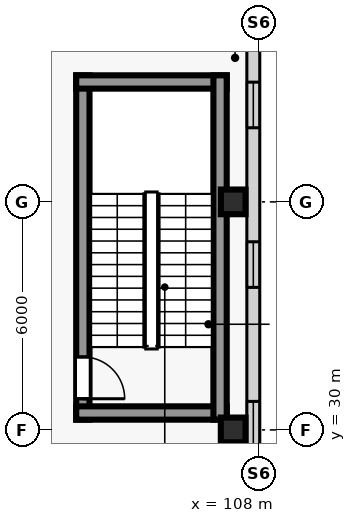
"""IFC4 building model, lengths in metres.
Left out: names, types, materials, properties, quantities, classifications, styles, units other than length and angle.
Written with IfcOpenShell. Run it as: python <this file> out.ifc"""

import sys

from ifc_helpers import new_model, si_unit, direction, frame, frame_2d, origin, origin_2d, place, context, subcontext, project, spatial, rectangle, extrude, source, transform, mapped, element, fill, save


model = new_model("IFC4")
c1 = context("Model", 3, precision=1e-05, world=origin(), true_north=direction((0.0, 1.0)))
c2 = subcontext(c1, "Body", "Model", "MODEL_VIEW")
j1 = project(units=[si_unit("LENGTHUNIT", "METRE"), si_unit("PLANEANGLEUNIT", "RADIAN")], contexts=[c1])
p1 = place(None, origin())
s1 = spatial("IfcSite", under=j1, at=p1, CompositionType="ELEMENT")
p2 = place(p1, origin())
s2 = spatial("IfcBuilding", under=s1, at=p2, CompositionType="ELEMENT")
p3 = place(p2, frame((0.0, 0.0, 9.0)))
s3 = spatial("IfcBuildingStorey", under=s2, at=p3, CompositionType="ELEMENT", Elevation=9.0)
p4 = place(p3, frame((103.345, 30.27, 0.0), z_axis=(0.0, 0.0, 1.0), x_axis=(0.0, 1.0, 0.0)))
e1 = element("IfcWall", 1, at=p4, inside=s3, PredefinedType="SHEAR", context=c2, shape_type="SweptSolid", body=[
    extrude(rectangle(XDim=9.06, YDim=0.35, at=frame_2d((4.53, 0.0))), origin(), (0.0, 0.0, 1.0), 4.5),
])
p5 = place(p4, frame((0.55, 0.0, 0.0)))
e2 = element("IfcOpeningElement", 2, at=p5, cuts=e1, PredefinedType="OPENING", context=c2, shape_type="SweptSolid", body=[
    extrude(rectangle(XDim=1.1, YDim=2.2, at=frame_2d((0.55, 1.1))), frame((0.0, 0.185, 0.0), z_axis=(0.0, -1.0, 0.0), x_axis=(1.0, 0.0, 0.0)), (0.0, 0.0, 1.0), 0.37),
])
for number, where, z_axis, x_axis in (
    (3, (103.17, 30.445, 0.0), (0.0, 0.0, 1.0), (1.0, 0.0, 0.0)),
    (4, (103.17, 39.155, 0.0), (0.0, 0.0, 1.0), (1.0, 0.0, 0.0)),
):
    element("IfcWall", number, at=place(p3, frame(where, z_axis=z_axis, x_axis=x_axis)), inside=s3, PredefinedType="SHEAR", context=c2, shape_type="SweptSolid", body=[
        extrude(rectangle(XDim=3.96, YDim=0.35, at=frame_2d((1.98, 0.0))), origin(), (0.0, 0.0, 1.0), 4.5),
    ])
p6 = place(p3, frame((106.955, 30.27, 0.0), z_axis=(0.0, 0.0, 1.0), x_axis=(0.0, 1.0, 0.0)))
e5 = element("IfcWall", 5, at=p6, inside=s3, PredefinedType="SHEAR", context=c2, shape_type="SweptSolid", body=[
    extrude(rectangle(XDim=9.06, YDim=0.35, at=frame_2d((4.53, 0.0))), origin(), (0.0, 0.0, 1.0), 4.5),
])
m1 = source(origin(), c2, "Body", "SweptSolid", [
    extrude(rectangle(XDim=0.65, YDim=0.65, at=origin_2d()), origin(), (0.0, 0.0, 1.0), 4.5),
])
for number, where, z_axis, x_axis in (
    (6, (107.3, 30.0, 0.0), (0.0, 0.0, 1.0), (1.0, 0.0, 0.0)),
    (7, (107.3, 36.0, 0.0), (0.0, 0.0, 1.0), (1.0, 0.0, 0.0)),
):
    element("IfcColumn", number, at=place(p3, frame(where, z_axis=z_axis, x_axis=x_axis)), inside=s3, PredefinedType="COLUMN", context=c2, shape_type="MappedRepresentation", body=[
        mapped(m1, transform((0.0, 0.0, 0.0), scale=1.0)),
    ])
p7 = place(p3, frame((107.83, 10.07, 0.0), z_axis=(0.0, 0.0, 1.0), x_axis=(0.0, 1.0, 0.0)))
e8 = element("IfcWall", 8, at=p7, inside=s3, PredefinedType="SOLIDWALL", context=c2, shape_type="SweptSolid", body=[
    extrude(rectangle(XDim=31.76, YDim=0.34, at=frame_2d((15.88, 0.0))), origin(), (0.0, 0.0, 1.0), 4.2),
])
p8 = place(p7, frame((2.68, 0.0, 0.95)))
e9 = element("IfcOpeningElement", 9, at=p8, cuts=e8, PredefinedType="OPENING", context=c2, shape_type="SweptSolid", body=[
    extrude(rectangle(XDim=1.2, YDim=1.5, at=frame_2d((0.6, 0.75))), frame((0.0, 0.18, 0.0), z_axis=(0.0, -1.0, 0.0), x_axis=(1.0, 0.0, 0.0)), (0.0, 0.0, 1.0), 0.36),
])
p9 = place(p7, frame((6.88, 0.0, 0.95)))
e10 = element("IfcOpeningElement", 10, at=p9, cuts=e8, PredefinedType="OPENING", context=c2, shape_type="SweptSolid", body=[
    extrude(rectangle(XDim=1.2, YDim=1.5, at=frame_2d((0.6, 0.75))), frame((0.0, 0.18, 0.0), z_axis=(0.0, -1.0, 0.0), x_axis=(1.0, 0.0, 0.0)), (0.0, 0.0, 1.0), 0.36),
])
p10 = place(p7, frame((11.08, 0.0, 0.95)))
e11 = element("IfcOpeningElement", 11, at=p10, cuts=e8, PredefinedType="OPENING", context=c2, shape_type="SweptSolid", body=[
    extrude(rectangle(XDim=1.2, YDim=1.5, at=frame_2d((0.6, 0.75))), frame((0.0, 0.18, 0.0), z_axis=(0.0, -1.0, 0.0), x_axis=(1.0, 0.0, 0.0)), (0.0, 0.0, 1.0), 0.36),
])
p11 = place(p7, frame((15.28, 0.0, 0.95)))
e12 = element("IfcOpeningElement", 12, at=p11, cuts=e8, PredefinedType="OPENING", context=c2, shape_type="SweptSolid", body=[
    extrude(rectangle(XDim=1.2, YDim=1.5, at=frame_2d((0.6, 0.75))), frame((0.0, 0.18, 0.0), z_axis=(0.0, -1.0, 0.0), x_axis=(1.0, 0.0, 0.0)), (0.0, 0.0, 1.0), 0.36),
])
p12 = place(p7, frame((19.48, 0.0, 0.95)))
e13 = element("IfcOpeningElement", 13, at=p12, cuts=e8, PredefinedType="OPENING", context=c2, shape_type="SweptSolid", body=[
    extrude(rectangle(XDim=1.2, YDim=1.5, at=frame_2d((0.6, 0.75))), frame((0.0, 0.18, 0.0), z_axis=(0.0, -1.0, 0.0), x_axis=(1.0, 0.0, 0.0)), (0.0, 0.0, 1.0), 0.36),
])
p13 = place(p7, frame((23.68, 0.0, 0.95)))
e14 = element("IfcOpeningElement", 14, at=p13, cuts=e8, PredefinedType="OPENING", context=c2, shape_type="SweptSolid", body=[
    extrude(rectangle(XDim=1.2, YDim=1.5, at=frame_2d((0.6, 0.75))), frame((0.0, 0.18, 0.0), z_axis=(0.0, -1.0, 0.0), x_axis=(1.0, 0.0, 0.0)), (0.0, 0.0, 1.0), 0.36),
])
p14 = place(p7, frame((27.88, 0.0, 0.95)))
e15 = element("IfcOpeningElement", 15, at=p14, cuts=e8, PredefinedType="OPENING", context=c2, shape_type="SweptSolid", body=[
    extrude(rectangle(XDim=1.2, YDim=1.5, at=frame_2d((0.6, 0.75))), frame((0.0, 0.18, 0.0), z_axis=(0.0, -1.0, 0.0), x_axis=(1.0, 0.0, 0.0)), (0.0, 0.0, 1.0), 0.36),
])
m2 = source(origin(), c2, "Body", "SweptSolid", [
    extrude(rectangle(XDim=1.2, YDim=1.5, at=frame_2d((0.6, 0.75))), frame((0.0, 0.03, 0.0), z_axis=(0.0, -1.0, 0.0), x_axis=(1.0, 0.0, 0.0)), (0.0, 0.0, 1.0), 0.06),
])
p15 = place(p12, origin())
e16 = element("IfcWindow", 16, at=p15, inside=s3, PartitioningType="SINGLE_PANEL", PredefinedType="WINDOW", context=c2, shape_type="MappedRepresentation", body=[
    mapped(m2, transform((0.0, 0.0, 0.0), scale=1.0)),
])
fill(e13, e16)
p16 = place(p13, origin())
e17 = element("IfcWindow", 17, at=p16, inside=s3, PartitioningType="SINGLE_PANEL", PredefinedType="WINDOW", context=c2, shape_type="MappedRepresentation", body=[
    mapped(m2, transform((0.0, 0.0, 0.0), scale=1.0)),
])
fill(e14, e17)
p17 = place(p14, origin())
e18 = element("IfcWindow", 18, at=p17, inside=s3, PartitioningType="SINGLE_PANEL", PredefinedType="WINDOW", context=c2, shape_type="MappedRepresentation", body=[
    mapped(m2, transform((0.0, 0.0, 0.0), scale=1.0)),
])
fill(e15, e18)
m3 = source(origin(), c2, "Body", "SweptSolid", [
    extrude(rectangle(XDim=1.1, YDim=2.2, at=frame_2d((0.55, 1.1))), frame((0.0, 0.025, 0.0), z_axis=(0.0, -1.0, 0.0), x_axis=(1.0, 0.0, 0.0)), (0.0, 0.0, 1.0), 0.05),
])
p18 = place(p5, frame((1.1, 0.0, 0.0), z_axis=(0.0, 0.0, 1.0), x_axis=(-1.0, 0.0, 0.0)))
e19 = element("IfcDoor", 19, at=p18, inside=s3, OperationType="SINGLE_SWING_RIGHT", PredefinedType="DOOR", context=c2, shape_type="MappedRepresentation", body=[
    mapped(m3, transform((0.0, 0.0, 0.0), scale=1.0)),
])
fill(e2, e19)
save(model, sys.argv[1])
